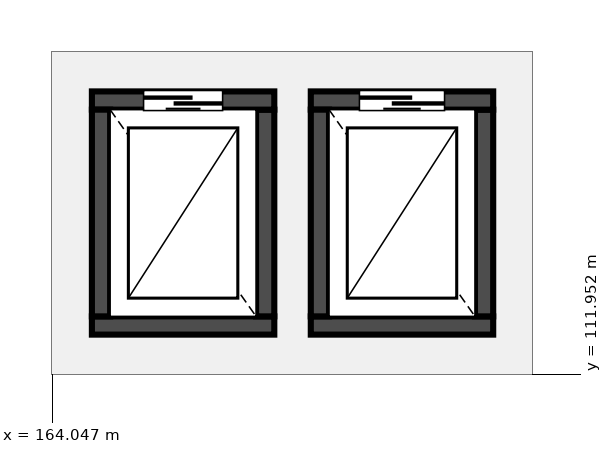
"""IFC4 building model, lengths in metres.
Left out: names, types, materials, properties, quantities, classifications, styles, units other than length and angle.
Written with IfcOpenShell. Run it as: python <this file> out.ifc"""

import sys

from ifc_helpers import new_model, si_unit, direction, frame, frame_2d, origin, place, context, subcontext, project, spatial, rectangle, extrude, element, fill, save


model = new_model("IFC4")
c1 = context("Model", 3, precision=1e-05, world=origin(), true_north=direction((0.0, 1.0)))
c2 = subcontext(c1, "Body", "Model", "MODEL_VIEW")
j1 = project(units=[si_unit("LENGTHUNIT", "METRE"), si_unit("PLANEANGLEUNIT", "RADIAN")], contexts=[c1])
p1 = place(None, origin())
s1 = spatial("IfcSite", under=j1, at=p1, CompositionType="ELEMENT")
p2 = place(p1, origin())
s2 = spatial("IfcBuilding", under=s1, at=p2, CompositionType="ELEMENT")
p3 = place(p2, frame((0.0, 0.0, 17.8)))
s3 = spatial("IfcBuildingStorey", under=s2, at=p3, CompositionType="ELEMENT", Elevation=17.8)
p4 = place(p3, frame((164.7, 112.75, 0.0), z_axis=(0.0, 0.0, 1.0), x_axis=(1.0, 0.0, 0.0)))
e1 = element("IfcWall", 1, at=p4, inside=s3, PredefinedType="SHEAR", context=c2, shape_type="SweptSolid", body=[
    extrude(rectangle(XDim=3.0, YDim=0.3, at=frame_2d((1.5, 0.0))), origin(), (0.0, 0.0, 1.0), 4.2),
])
p5 = place(p3, frame((167.55, 112.9, 0.0), z_axis=(0.0, 0.0, 1.0), x_axis=(0.0, 1.0, 0.0)))
e2 = element("IfcWall", 2, at=p5, inside=s3, PredefinedType="SHEAR", context=c2, shape_type="SweptSolid", body=[
    extrude(rectangle(XDim=3.4, YDim=0.3, at=frame_2d((1.7, 0.0))), origin(), (0.0, 0.0, 1.0), 4.2),
])
p6 = place(p3, frame((167.7, 116.45, 0.0), z_axis=(0.0, 0.0, 1.0), x_axis=(-1.0, 0.0, 0.0)))
e3 = element("IfcWall", 3, at=p6, inside=s3, PredefinedType="SHEAR", context=c2, shape_type="SweptSolid", body=[
    extrude(rectangle(XDim=3.0, YDim=0.3, at=frame_2d((1.5, 0.0))), origin(), (0.0, 0.0, 1.0), 4.2),
])
p7 = place(p6, frame((0.85, 0.0, 0.0)))
e4 = element("IfcOpeningElement", 4, at=p7, cuts=e3, PredefinedType="OPENING", context=c2, shape_type="SweptSolid", body=[
    extrude(rectangle(XDim=1.3, YDim=2.3, at=frame_2d((0.65, 1.15))), frame((0.0, 0.16, 0.0), z_axis=(0.0, -1.0, 0.0), x_axis=(1.0, 0.0, 0.0)), (0.0, 0.0, 1.0), 0.32),
])
p8 = place(p3, frame((164.85, 116.3, 0.0), z_axis=(0.0, 0.0, 1.0), x_axis=(0.0, -1.0, 0.0)))
e5 = element("IfcWall", 5, at=p8, inside=s3, PredefinedType="SHEAR", context=c2, shape_type="SweptSolid", body=[
    extrude(rectangle(XDim=3.4, YDim=0.3, at=frame_2d((1.7, 0.0))), origin(), (0.0, 0.0, 1.0), 4.2),
])
p9 = place(p3, frame((168.3, 112.75, 0.0), z_axis=(0.0, 0.0, 1.0), x_axis=(1.0, 0.0, 0.0)))
e6 = element("IfcWall", 6, at=p9, inside=s3, PredefinedType="SHEAR", context=c2, shape_type="SweptSolid", body=[
    extrude(rectangle(XDim=3.0, YDim=0.3, at=frame_2d((1.5, 0.0))), origin(), (0.0, 0.0, 1.0), 4.2),
])
p10 = place(p3, frame((171.15, 112.9, 0.0), z_axis=(0.0, 0.0, 1.0), x_axis=(0.0, 1.0, 0.0)))
e7 = element("IfcWall", 7, at=p10, inside=s3, PredefinedType="SHEAR", context=c2, shape_type="SweptSolid", body=[
    extrude(rectangle(XDim=3.4, YDim=0.3, at=frame_2d((1.7, 0.0))), origin(), (0.0, 0.0, 1.0), 4.2),
])
p11 = place(p3, frame((171.3, 116.45, 0.0), z_axis=(0.0, 0.0, 1.0), x_axis=(-1.0, 0.0, 0.0)))
e8 = element("IfcWall", 8, at=p11, inside=s3, PredefinedType="SHEAR", context=c2, shape_type="SweptSolid", body=[
    extrude(rectangle(XDim=3.0, YDim=0.3, at=frame_2d((1.5, 0.0))), origin(), (0.0, 0.0, 1.0), 4.2),
])
p12 = place(p11, frame((0.8, 0.0, 0.0)))
e9 = element("IfcOpeningElement", 9, at=p12, cuts=e8, PredefinedType="OPENING", context=c2, shape_type="SweptSolid", body=[
    extrude(rectangle(XDim=1.4, YDim=2.3, at=frame_2d((0.7, 1.15))), frame((0.0, 0.16, 0.0), z_axis=(0.0, -1.0, 0.0), x_axis=(1.0, 0.0, 0.0)), (0.0, 0.0, 1.0), 0.32),
])
p13 = place(p3, frame((168.45, 116.3, 0.0), z_axis=(0.0, 0.0, 1.0), x_axis=(0.0, -1.0, 0.0)))
e10 = element("IfcWall", 10, at=p13, inside=s3, PredefinedType="SHEAR", context=c2, shape_type="SweptSolid", body=[
    extrude(rectangle(XDim=3.4, YDim=0.3, at=frame_2d((1.7, 0.0))), origin(), (0.0, 0.0, 1.0), 4.2),
])
p14 = place(p7, origin())
e11 = element("IfcDoor", 11, at=p14, inside=s3, OperationType="SLIDING_TO_LEFT", PredefinedType="DOOR", context=c2, shape_type="SweptSolid", body=[
    extrude(rectangle(XDim=1.3, YDim=2.3, at=frame_2d((0.65, 1.15))), frame((0.0, 0.025, 0.0), z_axis=(0.0, -1.0, 0.0), x_axis=(1.0, 0.0, 0.0)), (0.0, 0.0, 1.0), 0.05),
])
fill(e4, e11)
p15 = place(p12, origin())
e12 = element("IfcDoor", 12, at=p15, inside=s3, OperationType="SLIDING_TO_RIGHT", PredefinedType="DOOR", context=c2, shape_type="SweptSolid", body=[
    extrude(rectangle(XDim=1.4, YDim=2.3, at=frame_2d((0.7, 1.15))), frame((0.0, 0.025, 0.0), z_axis=(0.0, -1.0, 0.0), x_axis=(1.0, 0.0, 0.0)), (0.0, 0.0, 1.0), 0.05),
])
fill(e9, e12)
save(model, sys.argv[1])
